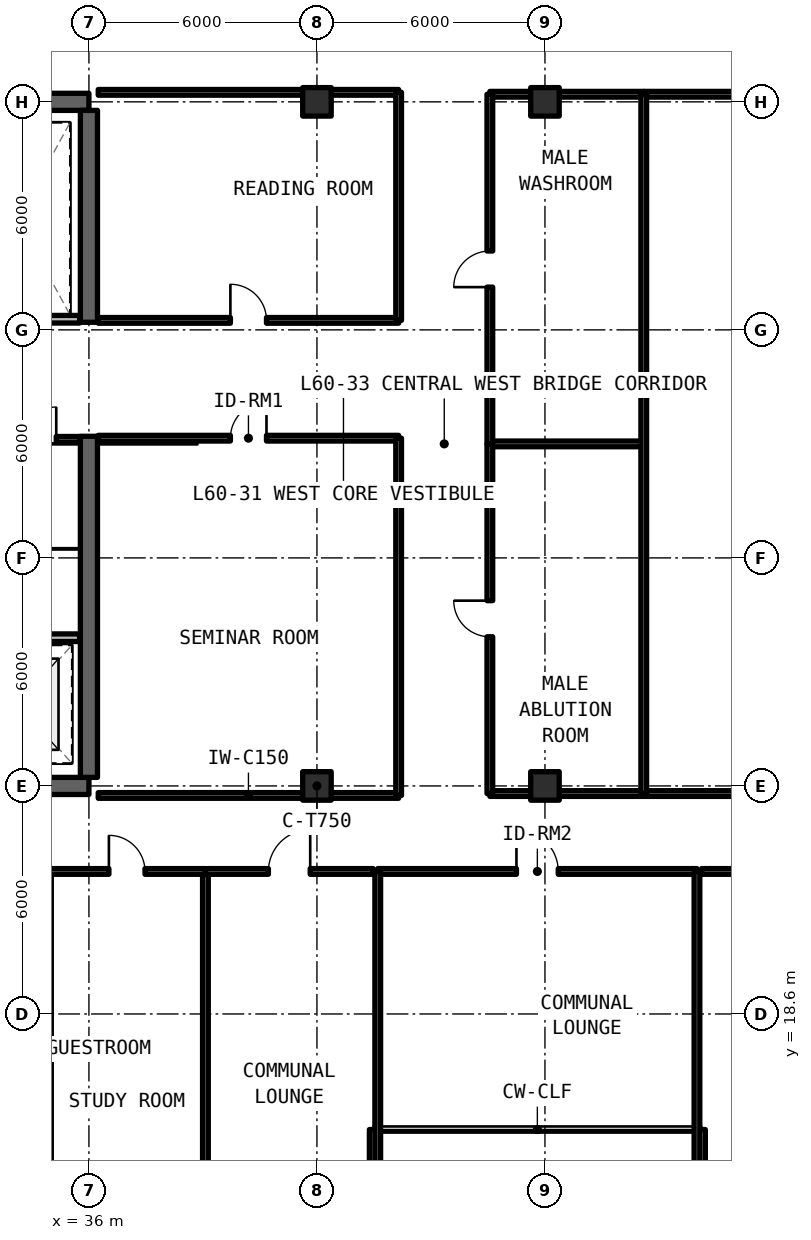
"""IFC4 building model, lengths in metres.
Left out: names, types, materials, properties, quantities, classifications, styles, units other than length and angle.
Written with IfcOpenShell. Run it as: python <this file> out.ifc"""

import sys

from ifc_helpers import new_model, si_unit, direction, frame, frame_2d, origin, origin_2d, place, context, subcontext, project, spatial, rectangle, extrude, element, fill, save


model = new_model("IFC4")
c1 = context("Model", 3, precision=1e-05, world=origin(), true_north=direction((0.0, 1.0)))
c2 = subcontext(c1, "Body", "Model", "MODEL_VIEW")
j1 = project(units=[si_unit("LENGTHUNIT", "METRE"), si_unit("PLANEANGLEUNIT", "RADIAN")], contexts=[c1])
p1 = place(None, origin())
s1 = spatial("IfcSite", under=j1, at=p1, CompositionType="ELEMENT")
p2 = place(p1, origin())
s2 = spatial("IfcBuilding", under=s1, at=p2, CompositionType="ELEMENT")
p3 = place(p2, frame((0.0, 0.0, 215.49)))
s3 = spatial("IfcBuildingStorey", under=s2, at=p3, CompositionType="ELEMENT", Elevation=215.49)
for number, where, z_axis, x_axis in (
    (1, (24.0, 24.6, 0.0), (0.0, 0.0, 1.0), (1.0, 0.0, 0.0)),
    (2, (36.0, 42.6, 0.0), (0.0, 0.0, 1.0), (-1.0, 0.0, 0.0)),
):
    element("IfcWall", number, at=place(p3, frame(where, z_axis=z_axis, x_axis=x_axis)), inside=s3, PredefinedType="SHEAR", context=c2, shape_type="SweptSolid", body=[
        extrude(rectangle(XDim=12.0, YDim=0.45, at=frame_2d((6.0, 0.0))), origin(), (0.0, 0.0, 1.0), 3.63),
    ])
p4 = place(p3, frame((36.0, 24.825, 0.0), z_axis=(0.0, 0.0, 1.0), x_axis=(0.0, 1.0, 0.0)))
e3 = element("IfcWall", 3, at=p4, inside=s3, PredefinedType="SHEAR", context=c2, shape_type="SweptSolid", body=[
    extrude(rectangle(XDim=8.975, YDim=0.45, at=frame_2d((4.488, 0.0))), origin(), (0.0, 0.0, 1.0), 3.63),
])
p5 = place(p3, frame((36.0, 36.8, 0.0), z_axis=(0.0, 0.0, 1.0), x_axis=(0.0, 1.0, 0.0)))
e4 = element("IfcWall", 4, at=p5, inside=s3, PredefinedType="SHEAR", context=c2, shape_type="SweptSolid", body=[
    extrude(rectangle(XDim=5.575, YDim=0.45, at=frame_2d((2.788, 0.0))), origin(), (0.0, 0.0, 1.0), 3.63),
])
for number, where, z_axis, x_axis in (
    (5, (42.0, 24.6, 0.0), (0.0, 0.0, 1.0), (1.0, 0.0, 0.0)),
    (6, (42.0, 42.6, 0.0), (0.0, 0.0, 1.0), (1.0, 0.0, 0.0)),
    (7, (48.0, 24.6, 0.0), (0.0, 0.0, 1.0), (1.0, 0.0, 0.0)),
    (8, (48.0, 42.6, 0.0), (0.0, 0.0, 1.0), (1.0, 0.0, 0.0)),
):
    element("IfcColumn", number, at=place(p3, frame(where, z_axis=z_axis, x_axis=x_axis)), inside=s3, PredefinedType="COLUMN", context=c2, shape_type="SweptSolid", body=[
        extrude(rectangle(XDim=0.75, YDim=0.75, at=origin_2d()), origin(), (0.0, 0.0, 1.0), 3.63),
    ])
for number, where, z_axis, x_axis in (
    (9, (43.49, 12.16, 0.0), (0.0, 0.0, 1.0), (0.0, 1.0, 0.0)),
    (10, (52.11, 15.56, 0.0), (0.0, 0.0, 1.0), (0.0, -1.0, 0.0)),
):
    element("IfcWall", number, at=place(p3, frame(where, z_axis=z_axis, x_axis=x_axis)), inside=s3, PredefinedType="SOLIDWALL", context=c2, shape_type="SweptSolid", body=[
        extrude(rectangle(XDim=3.4, YDim=0.22, at=frame_2d((1.7, 0.0))), origin(), (0.0, 0.0, 1.0), 3.41),
    ])
p6 = place(p3, frame((28.17, 28.5, 0.0), z_axis=(0.0, 0.0, 1.0), x_axis=(1.0, 0.0, 0.0)))
e11 = element("IfcWall", 11, at=p6, inside=s3, PredefinedType="SOLIDWALL", context=c2, shape_type="SweptSolid", body=[
    extrude(rectangle(XDim=7.585, YDim=0.2, at=frame_2d((3.792, 0.0))), origin(), (0.0, 0.0, 1.0), 2.63),
])
p7 = place(p6, frame((3.03, 0.0, 0.0)))
e12 = element("IfcOpeningElement", 12, at=p7, cuts=e11, PredefinedType="OPENING", context=c2, shape_type="SweptSolid", body=[
    extrude(rectangle(XDim=1.0, YDim=2.15, at=frame_2d((0.5, 1.075))), frame((0.0, 0.11, 0.0), z_axis=(0.0, -1.0, 0.0), x_axis=(1.0, 0.0, 0.0)), (0.0, 0.0, 1.0), 0.22),
])
p8 = place(p3, frame((34.01, 33.72, 0.0), z_axis=(0.0, 0.0, 1.0), x_axis=(1.0, 0.0, 0.0)))
e13 = element("IfcWall", 13, at=p8, inside=s3, PredefinedType="SOLIDWALL", context=c2, shape_type="SweptSolid", body=[
    extrude(rectangle(XDim=1.745, YDim=0.15, at=frame_2d((0.873, 0.0))), origin(), (0.0, 0.0, 1.0), 2.63),
])
p9 = place(p8, frame((0.28, 0.0, 0.0)))
e14 = element("IfcOpeningElement", 14, at=p9, cuts=e13, PredefinedType="OPENING", context=c2, shape_type="SweptSolid", body=[
    extrude(rectangle(XDim=0.85, YDim=2.1, at=frame_2d((0.425, 1.05))), frame((0.0, 0.085, 0.0), z_axis=(0.0, -1.0, 0.0), x_axis=(1.0, 0.0, 0.0)), (0.0, 0.0, 1.0), 0.17),
])
p10 = place(p3, frame((32.68, 36.88, 0.0), z_axis=(0.0, 0.0, 1.0), x_axis=(1.0, 0.0, 0.0)))
e15 = element("IfcWall", 15, at=p10, inside=s3, PredefinedType="SOLIDWALL", context=c2, shape_type="SweptSolid", body=[
    extrude(rectangle(XDim=3.075, YDim=0.2, at=frame_2d((1.538, 0.0))), origin(), (0.0, 0.0, 1.0), 2.63),
])
p11 = place(p3, frame((36.245, 24.35, 0.0), z_axis=(0.0, 0.0, 1.0), x_axis=(1.0, 0.0, 0.0)))
e16 = element("IfcWall", 16, at=p11, inside=s3, PredefinedType="SOLIDWALL", context=c2, shape_type="SweptSolid", body=[
    extrude(rectangle(XDim=7.905, YDim=0.15, at=frame_2d((3.952, 0.0))), origin(), (0.0, 0.0, 1.0), 2.63),
])
p12 = place(p3, frame((36.245, 33.75, 0.0), z_axis=(0.0, 0.0, 1.0), x_axis=(1.0, 0.0, 0.0)))
e17 = element("IfcWall", 17, at=p12, inside=s3, PredefinedType="SOLIDWALL", context=c2, shape_type="SweptSolid", body=[
    extrude(rectangle(XDim=7.905, YDim=0.15, at=frame_2d((3.952, 0.0))), origin(), (0.0, 0.0, 1.0), 2.63),
])
p13 = place(p12, frame((3.478, 0.0, 0.0)))
e18 = element("IfcOpeningElement", 18, at=p13, cuts=e17, PredefinedType="OPENING", context=c2, shape_type="SweptSolid", body=[
    extrude(rectangle(XDim=0.95, YDim=2.15, at=frame_2d((0.475, 1.075))), frame((0.0, 0.085, 0.0), z_axis=(0.0, -1.0, 0.0), x_axis=(1.0, 0.0, 0.0)), (0.0, 0.0, 1.0), 0.17),
])
p14 = place(p3, frame((44.15, 24.35, 0.0), z_axis=(0.0, 0.0, 1.0), x_axis=(0.0, 1.0, 0.0)))
e19 = element("IfcWall", 19, at=p14, inside=s3, PredefinedType="SOLIDWALL", context=c2, shape_type="SweptSolid", body=[
    extrude(rectangle(XDim=9.4, YDim=0.15, at=frame_2d((4.7, 0.0))), origin(), (0.0, 0.0, 1.0), 2.63),
])
p15 = place(p3, frame((36.245, 36.85, 0.0), z_axis=(0.0, 0.0, 1.0), x_axis=(1.0, 0.0, 0.0)))
e20 = element("IfcWall", 20, at=p15, inside=s3, PredefinedType="SOLIDWALL", context=c2, shape_type="SweptSolid", body=[
    extrude(rectangle(XDim=7.905, YDim=0.15, at=frame_2d((3.952, 0.0))), origin(), (0.0, 0.0, 1.0), 2.63),
])
p16 = place(p15, frame((3.478, 0.0, 0.0)))
e21 = element("IfcOpeningElement", 21, at=p16, cuts=e20, PredefinedType="OPENING", context=c2, shape_type="SweptSolid", body=[
    extrude(rectangle(XDim=0.95, YDim=2.15, at=frame_2d((0.475, 1.075))), frame((0.0, 0.085, 0.0), z_axis=(0.0, -1.0, 0.0), x_axis=(1.0, 0.0, 0.0)), (0.0, 0.0, 1.0), 0.17),
])
p17 = place(p3, frame((36.245, 42.85, 0.0), z_axis=(0.0, 0.0, 1.0), x_axis=(1.0, 0.0, 0.0)))
e22 = element("IfcWall", 22, at=p17, inside=s3, PredefinedType="SOLIDWALL", context=c2, shape_type="SweptSolid", body=[
    extrude(rectangle(XDim=7.905, YDim=0.15, at=frame_2d((3.952, 0.0))), origin(), (0.0, 0.0, 1.0), 2.63),
])
p18 = place(p3, frame((44.15, 36.85, 0.0), z_axis=(0.0, 0.0, 1.0), x_axis=(0.0, 1.0, 0.0)))
e23 = element("IfcWall", 23, at=p18, inside=s3, PredefinedType="SOLIDWALL", context=c2, shape_type="SweptSolid", body=[
    extrude(rectangle(XDim=6.0, YDim=0.15, at=frame_2d((3.0, 0.0))), origin(), (0.0, 0.0, 1.0), 2.63),
])
for number, where, z_axis, x_axis in (
    (24, (46.55, 24.4, 0.0), (0.0, 0.0, 1.0), (1.0, 0.0, 0.0)),
    (25, (46.55, 33.6, 0.0), (0.0, 0.0, 1.0), (1.0, 0.0, 0.0)),
):
    element("IfcWall", number, at=place(p3, frame(where, z_axis=z_axis, x_axis=x_axis)), inside=s3, PredefinedType="SOLIDWALL", context=c2, shape_type="SweptSolid", body=[
        extrude(rectangle(XDim=4.05, YDim=0.15, at=frame_2d((2.025, 0.0))), origin(), (0.0, 0.0, 1.0), 2.63),
    ])
p19 = place(p3, frame((46.55, 24.4, 0.0), z_axis=(0.0, 0.0, 1.0), x_axis=(0.0, 1.0, 0.0)))
e26 = element("IfcWall", 26, at=p19, inside=s3, PredefinedType="SOLIDWALL", context=c2, shape_type="SweptSolid", body=[
    extrude(rectangle(XDim=9.2, YDim=0.15, at=frame_2d((4.6, 0.0))), origin(), (0.0, 0.0, 1.0), 2.63),
])
p20 = place(p19, frame((4.125, 0.0, 0.0)))
e27 = element("IfcOpeningElement", 27, at=p20, cuts=e26, PredefinedType="OPENING", context=c2, shape_type="SweptSolid", body=[
    extrude(rectangle(XDim=0.95, YDim=2.15, at=frame_2d((0.475, 1.075))), frame((0.0, 0.085, 0.0), z_axis=(0.0, -1.0, 0.0), x_axis=(1.0, 0.0, 0.0)), (0.0, 0.0, 1.0), 0.17),
])
p21 = place(p3, frame((46.55, 42.8, 0.0), z_axis=(0.0, 0.0, 1.0), x_axis=(1.0, 0.0, 0.0)))
e28 = element("IfcWall", 28, at=p21, inside=s3, PredefinedType="SOLIDWALL", context=c2, shape_type="SweptSolid", body=[
    extrude(rectangle(XDim=4.05, YDim=0.15, at=frame_2d((2.025, 0.0))), origin(), (0.0, 0.0, 1.0), 2.63),
])
p22 = place(p3, frame((46.55, 33.6, 0.0), z_axis=(0.0, 0.0, 1.0), x_axis=(0.0, 1.0, 0.0)))
e29 = element("IfcWall", 29, at=p22, inside=s3, PredefinedType="SOLIDWALL", context=c2, shape_type="SweptSolid", body=[
    extrude(rectangle(XDim=9.2, YDim=0.15, at=frame_2d((4.6, 0.0))), origin(), (0.0, 0.0, 1.0), 2.63),
])
p23 = place(p22, frame((4.125, 0.0, 0.0)))
e30 = element("IfcOpeningElement", 30, at=p23, cuts=e29, PredefinedType="OPENING", context=c2, shape_type="SweptSolid", body=[
    extrude(rectangle(XDim=0.95, YDim=2.15, at=frame_2d((0.475, 1.075))), frame((0.0, 0.085, 0.0), z_axis=(0.0, -1.0, 0.0), x_axis=(1.0, 0.0, 0.0)), (0.0, 0.0, 1.0), 0.17),
])
p24 = place(p3, frame((50.6, 24.4, 0.0), z_axis=(0.0, 0.0, 1.0), x_axis=(1.0, 0.0, 0.0)))
e31 = element("IfcWall", 31, at=p24, inside=s3, PredefinedType="SOLIDWALL", context=c2, shape_type="SweptSolid", body=[
    extrude(rectangle(XDim=12.8, YDim=0.15, at=frame_2d((6.4, 0.0))), origin(), (0.0, 0.0, 1.0), 2.63),
])
p25 = place(p24, frame((5.7, 0.0, 0.0)))
e32 = element("IfcOpeningElement", 32, at=p25, cuts=e31, PredefinedType="OPENING", context=c2, shape_type="SweptSolid", body=[
    extrude(rectangle(XDim=1.4, YDim=2.15, at=frame_2d((0.7, 1.075))), frame((0.0, 0.085, 0.0), z_axis=(0.0, -1.0, 0.0), x_axis=(1.0, 0.0, 0.0)), (0.0, 0.0, 1.0), 0.17),
])
p26 = place(p3, frame((50.6, 42.8, 0.0), z_axis=(0.0, 0.0, 1.0), x_axis=(1.0, 0.0, 0.0)))
e33 = element("IfcWall", 33, at=p26, inside=s3, PredefinedType="SOLIDWALL", context=c2, shape_type="SweptSolid", body=[
    extrude(rectangle(XDim=12.8, YDim=0.15, at=frame_2d((6.4, 0.0))), origin(), (0.0, 0.0, 1.0), 2.63),
])
p27 = place(p3, frame((50.6, 24.4, 0.0), z_axis=(0.0, 0.0, 1.0), x_axis=(0.0, 1.0, 0.0)))
e34 = element("IfcWall", 34, at=p27, inside=s3, PredefinedType="SOLIDWALL", context=c2, shape_type="SweptSolid", body=[
    extrude(rectangle(XDim=18.4, YDim=0.15, at=frame_2d((9.2, 0.0))), origin(), (0.0, 0.0, 1.0), 2.63),
])
p28 = place(p3, frame((43.6, 22.35, 0.0), z_axis=(0.0, 0.0, 1.0), x_axis=(1.0, 0.0, 0.0)))
e35 = element("IfcWall", 35, at=p28, inside=s3, PredefinedType="SOLIDWALL", context=c2, shape_type="SweptSolid", body=[
    extrude(rectangle(XDim=8.4, YDim=0.15, at=frame_2d((4.2, 0.0))), origin(), (0.0, 0.0, 1.0), 2.63),
])
p29 = place(p28, frame((3.65, 0.0, 0.0)))
e36 = element("IfcOpeningElement", 36, at=p29, cuts=e35, PredefinedType="OPENING", context=c2, shape_type="SweptSolid", body=[
    extrude(rectangle(XDim=1.1, YDim=2.15, at=frame_2d((0.55, 1.075))), frame((0.0, 0.085, 0.0), z_axis=(0.0, -1.0, 0.0), x_axis=(1.0, 0.0, 0.0)), (0.0, 0.0, 1.0), 0.17),
])
for number, where, z_axis, x_axis in (
    (37, (43.6, 12.27, 0.0), (0.0, 0.0, 1.0), (0.0, 1.0, 0.0)),
    (38, (52.0, 12.27, 0.0), (0.0, 0.0, 1.0), (0.0, 1.0, 0.0)),
    (39, (39.065, 12.27, 0.0), (0.0, 0.0, 1.0), (0.0, 1.0, 0.0)),
):
    element("IfcWall", number, at=place(p3, frame(where, z_axis=z_axis, x_axis=x_axis)), inside=s3, PredefinedType="SOLIDWALL", context=c2, shape_type="SweptSolid", body=[
        extrude(rectangle(XDim=10.08, YDim=0.15, at=frame_2d((5.04, 0.0))), origin(), (0.0, 0.0, 1.0), 2.63),
    ])
p30 = place(p3, frame((34.936, 22.35, 0.0), z_axis=(0.0, 0.0, 1.0), x_axis=(1.0, 0.0, 0.0)))
e40 = element("IfcWall", 40, at=p30, inside=s3, PredefinedType="SOLIDWALL", context=c2, shape_type="SweptSolid", body=[
    extrude(rectangle(XDim=4.13, YDim=0.15, at=frame_2d((2.065, 0.0))), origin(), (0.0, 0.0, 1.0), 2.63),
])
p31 = place(p30, frame((1.59, 0.0, 0.0)))
e41 = element("IfcOpeningElement", 41, at=p31, cuts=e40, PredefinedType="OPENING", context=c2, shape_type="SweptSolid", body=[
    extrude(rectangle(XDim=0.95, YDim=2.15, at=frame_2d((0.475, 1.075))), frame((0.0, 0.085, 0.0), z_axis=(0.0, -1.0, 0.0), x_axis=(1.0, 0.0, 0.0)), (0.0, 0.0, 1.0), 0.17),
])
p32 = place(p3, frame((39.065, 22.35, 0.0), z_axis=(0.0, 0.0, 1.0), x_axis=(1.0, 0.0, 0.0)))
e42 = element("IfcWall", 42, at=p32, inside=s3, PredefinedType="SOLIDWALL", context=c2, shape_type="SweptSolid", body=[
    extrude(rectangle(XDim=4.415, YDim=0.15, at=frame_2d((2.207, 0.0))), origin(), (0.0, 0.0, 1.0), 2.63),
])
p33 = place(p32, frame((1.657, 0.0, 0.0)))
e43 = element("IfcOpeningElement", 43, at=p33, cuts=e42, PredefinedType="OPENING", context=c2, shape_type="SweptSolid", body=[
    extrude(rectangle(XDim=1.1, YDim=2.15, at=frame_2d((0.55, 1.075))), frame((0.0, 0.085, 0.0), z_axis=(0.0, -1.0, 0.0), x_axis=(1.0, 0.0, 0.0)), (0.0, 0.0, 1.0), 0.17),
])
p34 = place(p3, frame((52.12, 22.35, 0.0), z_axis=(0.0, 0.0, 1.0), x_axis=(1.0, 0.0, 0.0)))
e44 = element("IfcWall", 44, at=p34, inside=s3, PredefinedType="SOLIDWALL", context=c2, shape_type="SweptSolid", body=[
    extrude(rectangle(XDim=7.281, YDim=0.15, at=frame_2d((3.641, 0.0))), origin(), (0.0, 0.0, 1.0), 2.63),
])
p35 = place(p34, frame((3.166, 0.0, 0.0)))
e45 = element("IfcOpeningElement", 45, at=p35, cuts=e44, PredefinedType="OPENING", context=c2, shape_type="SweptSolid", body=[
    extrude(rectangle(XDim=0.95, YDim=2.15, at=frame_2d((0.475, 1.075))), frame((0.0, 0.085, 0.0), z_axis=(0.0, -1.0, 0.0), x_axis=(1.0, 0.0, 0.0)), (0.0, 0.0, 1.0), 0.17),
])
p36 = place(p9, origin())
e46 = element("IfcDoor", 46, at=p36, inside=s3, OperationType="SINGLE_SWING_RIGHT", PredefinedType="DOOR", context=c2, shape_type="SweptSolid", body=[
    extrude(rectangle(XDim=0.85, YDim=2.1, at=frame_2d((0.425, 1.05))), frame((0.0, 0.025, 0.0), z_axis=(0.0, -1.0, 0.0), x_axis=(1.0, 0.0, 0.0)), (0.0, 0.0, 1.0), 0.05),
])
fill(e14, e46)
p37 = place(p13, origin())
e47 = element("IfcDoor", 47, at=p37, inside=s3, OperationType="SINGLE_SWING_RIGHT", PredefinedType="DOOR", context=c2, shape_type="SweptSolid", body=[
    extrude(rectangle(XDim=0.95, YDim=2.15, at=frame_2d((0.475, 1.075))), frame((0.0, 0.025, 0.0), z_axis=(0.0, -1.0, 0.0), x_axis=(1.0, 0.0, 0.0)), (0.0, 0.0, 1.0), 0.05),
])
fill(e18, e47)
p38 = place(p16, origin())
e48 = element("IfcDoor", 48, at=p38, inside=s3, OperationType="SINGLE_SWING_LEFT", PredefinedType="DOOR", context=c2, shape_type="SweptSolid", body=[
    extrude(rectangle(XDim=0.95, YDim=2.15, at=frame_2d((0.475, 1.075))), frame((0.0, 0.025, 0.0), z_axis=(0.0, -1.0, 0.0), x_axis=(1.0, 0.0, 0.0)), (0.0, 0.0, 1.0), 0.05),
])
fill(e21, e48)
p39 = place(p20, origin())
e49 = element("IfcDoor", 49, at=p39, inside=s3, OperationType="SINGLE_SWING_RIGHT", PredefinedType="DOOR", context=c2, shape_type="SweptSolid", body=[
    extrude(rectangle(XDim=0.95, YDim=2.15, at=frame_2d((0.475, 1.075))), frame((0.0, 0.025, 0.0), z_axis=(0.0, -1.0, 0.0), x_axis=(1.0, 0.0, 0.0)), (0.0, 0.0, 1.0), 0.05),
])
fill(e27, e49)
p40 = place(p23, origin())
e50 = element("IfcDoor", 50, at=p40, inside=s3, OperationType="SINGLE_SWING_LEFT", PredefinedType="DOOR", context=c2, shape_type="SweptSolid", body=[
    extrude(rectangle(XDim=0.95, YDim=2.15, at=frame_2d((0.475, 1.075))), frame((0.0, 0.025, 0.0), z_axis=(0.0, -1.0, 0.0), x_axis=(1.0, 0.0, 0.0)), (0.0, 0.0, 1.0), 0.05),
])
fill(e30, e50)
p41 = place(p29, origin())
e51 = element("IfcDoor", 51, at=p41, inside=s3, OperationType="SINGLE_SWING_LEFT", PredefinedType="DOOR", context=c2, shape_type="SweptSolid", body=[
    extrude(rectangle(XDim=1.1, YDim=2.15, at=frame_2d((0.55, 1.075))), frame((0.0, 0.025, 0.0), z_axis=(0.0, -1.0, 0.0), x_axis=(1.0, 0.0, 0.0)), (0.0, 0.0, 1.0), 0.05),
])
fill(e36, e51)
p42 = place(p31, origin())
e52 = element("IfcDoor", 52, at=p42, inside=s3, OperationType="SINGLE_SWING_LEFT", PredefinedType="DOOR", context=c2, shape_type="SweptSolid", body=[
    extrude(rectangle(XDim=0.95, YDim=2.15, at=frame_2d((0.475, 1.075))), frame((0.0, 0.025, 0.0), z_axis=(0.0, -1.0, 0.0), x_axis=(1.0, 0.0, 0.0)), (0.0, 0.0, 1.0), 0.05),
])
fill(e41, e52)
p43 = place(p33, origin())
e53 = element("IfcDoor", 53, at=p43, inside=s3, OperationType="SINGLE_SWING_RIGHT", PredefinedType="DOOR", context=c2, shape_type="SweptSolid", body=[
    extrude(rectangle(XDim=1.1, YDim=2.15, at=frame_2d((0.55, 1.075))), frame((0.0, 0.025, 0.0), z_axis=(0.0, -1.0, 0.0), x_axis=(1.0, 0.0, 0.0)), (0.0, 0.0, 1.0), 0.05),
])
fill(e43, e53)
save(model, sys.argv[1])
